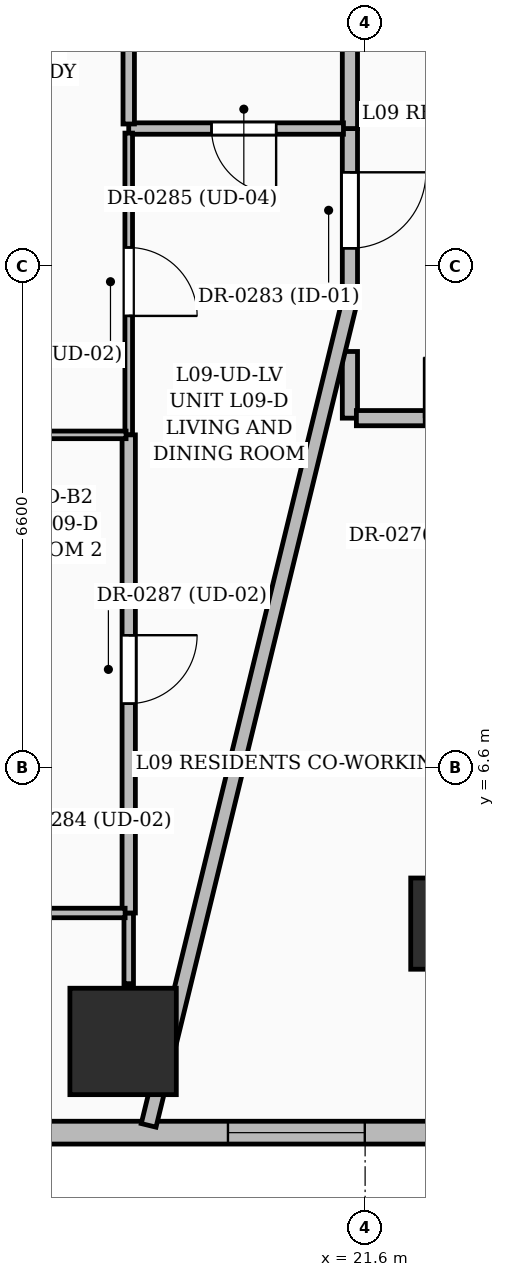
"""IFC4 building model, lengths in metres.
Left out: names, types, materials, properties, quantities, classifications, styles, units other than length and angle.
Written with IfcOpenShell. Run it as: python <this file> out.ifc"""

import sys

from ifc_helpers import new_model, si_unit, direction, frame, frame_2d, origin, origin_2d, place, context, subcontext, project, spatial, rectangle, extrude, element, fill, save


model = new_model("IFC4")
c1 = context("Model", 3, precision=1e-05, world=origin(), true_north=direction((0.0, 1.0)))
c2 = subcontext(c1, "Body", "Model", "MODEL_VIEW")
j1 = project(units=[si_unit("LENGTHUNIT", "METRE"), si_unit("PLANEANGLEUNIT", "RADIAN")], contexts=[c1])
p1 = place(None, origin())
s1 = spatial("IfcSite", under=j1, at=p1, CompositionType="ELEMENT")
p2 = place(p1, origin())
s2 = spatial("IfcBuilding", under=s1, at=p2, CompositionType="ELEMENT")
p3 = place(p2, frame((0.0, 0.0, 42.6)))
s3 = spatial("IfcBuildingStorey", under=s2, at=p3, CompositionType="ELEMENT", Elevation=42.6)
p4 = place(p3, frame((22.8, 4.55, 0.0), z_axis=(0.0, 0.0, 1.0), x_axis=(1.0, 0.0, 0.0)))
e1 = element("IfcColumn", 1, at=p4, inside=s3, PredefinedType="COLUMN", context=c2, shape_type="SweptSolid", body=[
    extrude(rectangle(XDim=1.2, YDim=1.2, at=origin_2d()), origin(), (0.0, 0.0, 1.0), 3.6),
])
p5 = place(p3, frame((18.416, 3.0, 0.0), z_axis=(0.0, 0.0, 1.0), x_axis=(1.0, 0.0, 0.0)))
e2 = element("IfcColumn", 2, at=p5, inside=s3, PredefinedType="COLUMN", context=c2, shape_type="SweptSolid", body=[
    extrude(rectangle(XDim=1.4, YDim=1.4, at=origin_2d()), origin(), (0.0, 0.0, 1.0), 3.6),
])
p6 = place(p3, frame((22.846, 1.8, 0.0), z_axis=(0.0, 0.0, 1.0), x_axis=(-1.0, 0.0, 0.0)))
e3 = element("IfcWall", 3, at=p6, inside=s3, PredefinedType="SOLIDWALL", context=c2, shape_type="SweptSolid", body=[
    extrude(rectangle(XDim=6.593, YDim=0.3, at=frame_2d((3.296, 0.0))), origin(), (0.0, 0.0, 1.0), 3.35),
])
p7 = place(p6, frame((1.25, 0.0, 0.6)))
e4 = element("IfcOpeningElement", 4, at=p7, cuts=e3, PredefinedType="OPENING", context=c2, shape_type="SweptSolid", body=[
    extrude(rectangle(XDim=1.8, YDim=2.1, at=frame_2d((0.9, 1.05))), frame((0.0, 0.16, 0.0), z_axis=(0.0, -1.0, 0.0), x_axis=(1.0, 0.0, 0.0)), (0.0, 0.0, 1.0), 0.32),
])
p8 = place(p3, frame((21.4, 12.077, 0.0), z_axis=(0.0, 0.0, 1.0), x_axis=(0.0, -1.0, 0.0)))
e5 = element("IfcWall", 5, at=p8, inside=s3, PredefinedType="PARTITIONING", context=c2, shape_type="SweptSolid", body=[
    extrude(rectangle(XDim=0.877, YDim=0.2, at=frame_2d((0.438, 0.0))), origin(), (0.0, 0.0, 1.0), 3.35),
])
p9 = place(p3, frame((21.485, 11.2, 0.0), z_axis=(0.0, 0.0, 1.0), x_axis=(1.0, 0.0, 0.0)))
e6 = element("IfcWall", 6, at=p9, inside=s3, PredefinedType="PARTITIONING", context=c2, shape_type="SweptSolid", body=[
    extrude(rectangle(XDim=3.384, YDim=0.2, at=frame_2d((1.692, 0.0))), origin(), (0.0, 0.0, 1.0), 2.787),
])
p10 = place(p9, frame((0.89, 0.0, 0.0)))
e7 = element("IfcOpeningElement", 7, at=p10, cuts=e6, PredefinedType="OPENING", context=c2, shape_type="SweptSolid", body=[
    extrude(rectangle(XDim=1.6, YDim=2.3, at=frame_2d((0.8, 1.15))), frame((0.0, 0.11, 0.0), z_axis=(0.0, -1.0, 0.0), x_axis=(1.0, 0.0, 0.0)), (0.0, 0.0, 1.0), 0.22),
])
p11 = place(p3, frame((21.4, 15.01, 0.0), z_axis=(0.0, 0.0, 1.0), x_axis=(0.0, -1.0, 0.0)))
e8 = element("IfcWall", 8, at=p11, inside=s3, PredefinedType="PARTITIONING", context=c2, shape_type="SweptSolid", body=[
    extrude(rectangle(XDim=2.26, YDim=0.2, at=frame_2d((1.13, 0.0))), origin(), (0.0, 0.0, 1.0), 2.787),
])
p12 = place(p11, frame((0.576, 0.0, 0.0)))
e9 = element("IfcOpeningElement", 9, at=p12, cuts=e8, PredefinedType="OPENING", context=c2, shape_type="SweptSolid", body=[
    extrude(rectangle(XDim=1.0, YDim=2.2, at=frame_2d((0.5, 1.1))), frame((0.0, 0.11, 0.0), z_axis=(0.0, -1.0, 0.0), x_axis=(1.0, 0.0, 0.0)), (0.0, 0.0, 1.0), 0.22),
])
p13 = place(p3, frame((21.4, 17.705, 0.0), z_axis=(0.0, 0.0, 1.0), x_axis=(0.0, -1.0, 0.0)))
e10 = element("IfcWall", 10, at=p13, inside=s3, PredefinedType="PARTITIONING", context=c2, shape_type="SweptSolid", body=[
    extrude(rectangle(XDim=2.695, YDim=0.2, at=frame_2d((1.348, 0.0))), origin(), (0.0, 0.0, 1.0), 2.787),
])
p14 = place(p3, frame((21.4, 12.75, 0.0), z_axis=(0.0, 0.0, 1.0), x_axis=(-0.237009503741, -0.971507331489, 0.0)))
e11 = element("IfcWall", 11, at=p14, inside=s3, PredefinedType="PARTITIONING", context=c2, shape_type="SweptSolid", body=[
    extrude(rectangle(XDim=11.172, YDim=0.2, at=frame_2d((5.586, 0.0))), origin(), (0.0, 0.0, 1.0), 2.279),
])
p15 = place(p3, frame((21.315, 15.01, 0.0), z_axis=(0.0, 0.0, 1.0), x_axis=(-1.0, 0.0, 0.0)))
e12 = element("IfcWall", 12, at=p15, inside=s3, PredefinedType="PARTITIONING", context=c2, shape_type="SweptSolid", body=[
    extrude(rectangle(XDim=2.825, YDim=0.15, at=frame_2d((1.413, 0.0))), origin(), (0.0, 0.0, 1.0), 2.787),
])
p16 = place(p15, frame((0.886, 0.0, 0.0)))
e13 = element("IfcOpeningElement", 13, at=p16, cuts=e12, PredefinedType="OPENING", context=c2, shape_type="SweptSolid", body=[
    extrude(rectangle(XDim=0.85, YDim=2.1, at=frame_2d((0.425, 1.05))), frame((0.0, 0.085, 0.0), z_axis=(0.0, -1.0, 0.0), x_axis=(1.0, 0.0, 0.0)), (0.0, 0.0, 1.0), 0.17),
])
p17 = place(p3, frame((18.49, 4.69, 0.0), z_axis=(0.0, 0.0, 1.0), x_axis=(0.0, -1.0, 0.0)))
e14 = element("IfcWall", 14, at=p17, inside=s3, PredefinedType="PARTITIONING", context=c2, shape_type="SweptSolid", body=[
    extrude(rectangle(XDim=0.93, YDim=0.125, at=frame_2d((0.465, 0.0))), origin(), (0.0, 0.0, 1.0), 3.35),
])
p18 = place(p3, frame((18.49, 14.95, 0.0), z_axis=(0.0, 0.0, 1.0), x_axis=(0.0, -1.0, 0.0)))
e15 = element("IfcWall", 15, at=p18, inside=s3, PredefinedType="PARTITIONING", context=c2, shape_type="SweptSolid", body=[
    extrude(rectangle(XDim=3.97, YDim=0.1, at=frame_2d((1.985, 0.0))), origin(), (0.0, 0.0, 1.0), 2.787),
])
p19 = place(p18, frame((1.505, 0.0, 0.0)))
e16 = element("IfcOpeningElement", 16, at=p19, cuts=e15, PredefinedType="OPENING", context=c2, shape_type="SweptSolid", body=[
    extrude(rectangle(XDim=0.9, YDim=2.15, at=frame_2d((0.45, 1.075))), frame((0.0, 0.06, 0.0), z_axis=(0.0, -1.0, 0.0), x_axis=(1.0, 0.0, 0.0)), (0.0, 0.0, 1.0), 0.12),
])
p20 = place(p3, frame((18.49, 10.98, 0.0), z_axis=(0.0, 0.0, 1.0), x_axis=(0.0, -1.0, 0.0)))
e17 = element("IfcWall", 17, at=p20, inside=s3, PredefinedType="PARTITIONING", context=c2, shape_type="SweptSolid", body=[
    extrude(rectangle(XDim=6.29, YDim=0.175, at=frame_2d((3.145, 0.0))), origin(), (0.0, 0.0, 1.0), 2.279),
])
p21 = place(p20, frame((2.635, 0.0, 0.0)))
e18 = element("IfcOpeningElement", 18, at=p21, cuts=e17, PredefinedType="OPENING", context=c2, shape_type="SweptSolid", body=[
    extrude(rectangle(XDim=0.9, YDim=2.15, at=frame_2d((0.45, 1.075))), frame((0.0, 0.097, 0.0), z_axis=(0.0, -1.0, 0.0), x_axis=(1.0, 0.0, 0.0)), (0.0, 0.0, 1.0), 0.195),
])
p22 = place(p3, frame((18.49, 17.75, 0.0), z_axis=(0.0, 0.0, 1.0), x_axis=(0.0, -1.0, 0.0)))
e19 = element("IfcWall", 19, at=p22, inside=s3, PredefinedType="PARTITIONING", context=c2, shape_type="SweptSolid", body=[
    extrude(rectangle(XDim=2.68, YDim=0.15, at=frame_2d((1.34, 0.0))), origin(), (0.0, 0.0, 1.0), 2.787),
])
p23 = place(p3, frame((18.442, 4.69, 0.0), z_axis=(0.0, 0.0, 1.0), x_axis=(-1.0, 0.0, 0.0)))
e20 = element("IfcWall", 20, at=p23, inside=s3, PredefinedType="PARTITIONING", context=c2, shape_type="SweptSolid", body=[
    extrude(rectangle(XDim=3.027, YDim=0.125, at=frame_2d((1.514, 0.0))), origin(), (0.0, 0.0, 1.0), 2.37),
])
p24 = place(p23, frame((1.024, 0.0, 0.0)))
e21 = element("IfcOpeningElement", 21, at=p24, cuts=e20, PredefinedType="OPENING", context=c2, shape_type="SweptSolid", body=[
    extrude(rectangle(XDim=0.9, YDim=2.15, at=frame_2d((0.45, 1.075))), frame((0.0, 0.072, 0.0), z_axis=(0.0, -1.0, 0.0), x_axis=(1.0, 0.0, 0.0)), (0.0, 0.0, 1.0), 0.145),
])
p25 = place(p3, frame((15.415, 10.98, 0.0), z_axis=(0.0, 0.0, 1.0), x_axis=(1.0, 0.0, 0.0)))
e22 = element("IfcWall", 22, at=p25, inside=s3, PredefinedType="PARTITIONING", context=c2, shape_type="SweptSolid", body=[
    extrude(rectangle(XDim=3.04, YDim=0.1, at=frame_2d((1.52, 0.0))), origin(), (0.0, 0.0, 1.0), 2.279),
])
p26 = place(p7, origin())
e23 = element("IfcWindow", 23, at=p26, inside=s3, PartitioningType="SINGLE_PANEL", PredefinedType="WINDOW", context=c2, shape_type="SweptSolid", body=[
    extrude(rectangle(XDim=1.8, YDim=2.1, at=frame_2d((0.9, 1.05))), frame((0.0, 0.03, 0.0), z_axis=(0.0, -1.0, 0.0), x_axis=(1.0, 0.0, 0.0)), (0.0, 0.0, 1.0), 0.06),
])
fill(e4, e23)
p27 = place(p10, origin())
e24 = element("IfcDoor", 24, at=p27, inside=s3, OperationType="DOUBLE_DOOR_SINGLE_SWING", PredefinedType="DOOR", context=c2, shape_type="SweptSolid", body=[
    extrude(rectangle(XDim=1.6, YDim=2.3, at=frame_2d((0.8, 1.15))), frame((0.0, 0.025, 0.0), z_axis=(0.0, -1.0, 0.0), x_axis=(1.0, 0.0, 0.0)), (0.0, 0.0, 1.0), 0.05),
])
fill(e7, e24)
p28 = place(p12, origin())
e25 = element("IfcDoor", 25, at=p28, inside=s3, OperationType="SINGLE_SWING_LEFT", PredefinedType="DOOR", context=c2, shape_type="SweptSolid", body=[
    extrude(rectangle(XDim=1.0, YDim=2.2, at=frame_2d((0.5, 1.1))), frame((0.0, 0.025, 0.0), z_axis=(0.0, -1.0, 0.0), x_axis=(1.0, 0.0, 0.0)), (0.0, 0.0, 1.0), 0.05),
])
fill(e9, e25)
p29 = place(p16, origin())
e26 = element("IfcDoor", 26, at=p29, inside=s3, OperationType="SINGLE_SWING_LEFT", PredefinedType="DOOR", context=c2, shape_type="SweptSolid", body=[
    extrude(rectangle(XDim=0.85, YDim=2.1, at=frame_2d((0.425, 1.05))), frame((0.0, 0.025, 0.0), z_axis=(0.0, -1.0, 0.0), x_axis=(1.0, 0.0, 0.0)), (0.0, 0.0, 1.0), 0.05),
])
fill(e13, e26)
p30 = place(p19, origin())
e27 = element("IfcDoor", 27, at=p30, inside=s3, OperationType="SINGLE_SWING_RIGHT", PredefinedType="DOOR", context=c2, shape_type="SweptSolid", body=[
    extrude(rectangle(XDim=0.9, YDim=2.15, at=frame_2d((0.45, 1.075))), frame((0.0, 0.025, 0.0), z_axis=(0.0, -1.0, 0.0), x_axis=(1.0, 0.0, 0.0)), (0.0, 0.0, 1.0), 0.05),
])
fill(e16, e27)
p31 = place(p21, origin())
e28 = element("IfcDoor", 28, at=p31, inside=s3, OperationType="SINGLE_SWING_LEFT", PredefinedType="DOOR", context=c2, shape_type="SweptSolid", body=[
    extrude(rectangle(XDim=0.9, YDim=2.15, at=frame_2d((0.45, 1.075))), frame((0.0, 0.025, 0.0), z_axis=(0.0, -1.0, 0.0), x_axis=(1.0, 0.0, 0.0)), (0.0, 0.0, 1.0), 0.05),
])
fill(e18, e28)
save(model, sys.argv[1])
